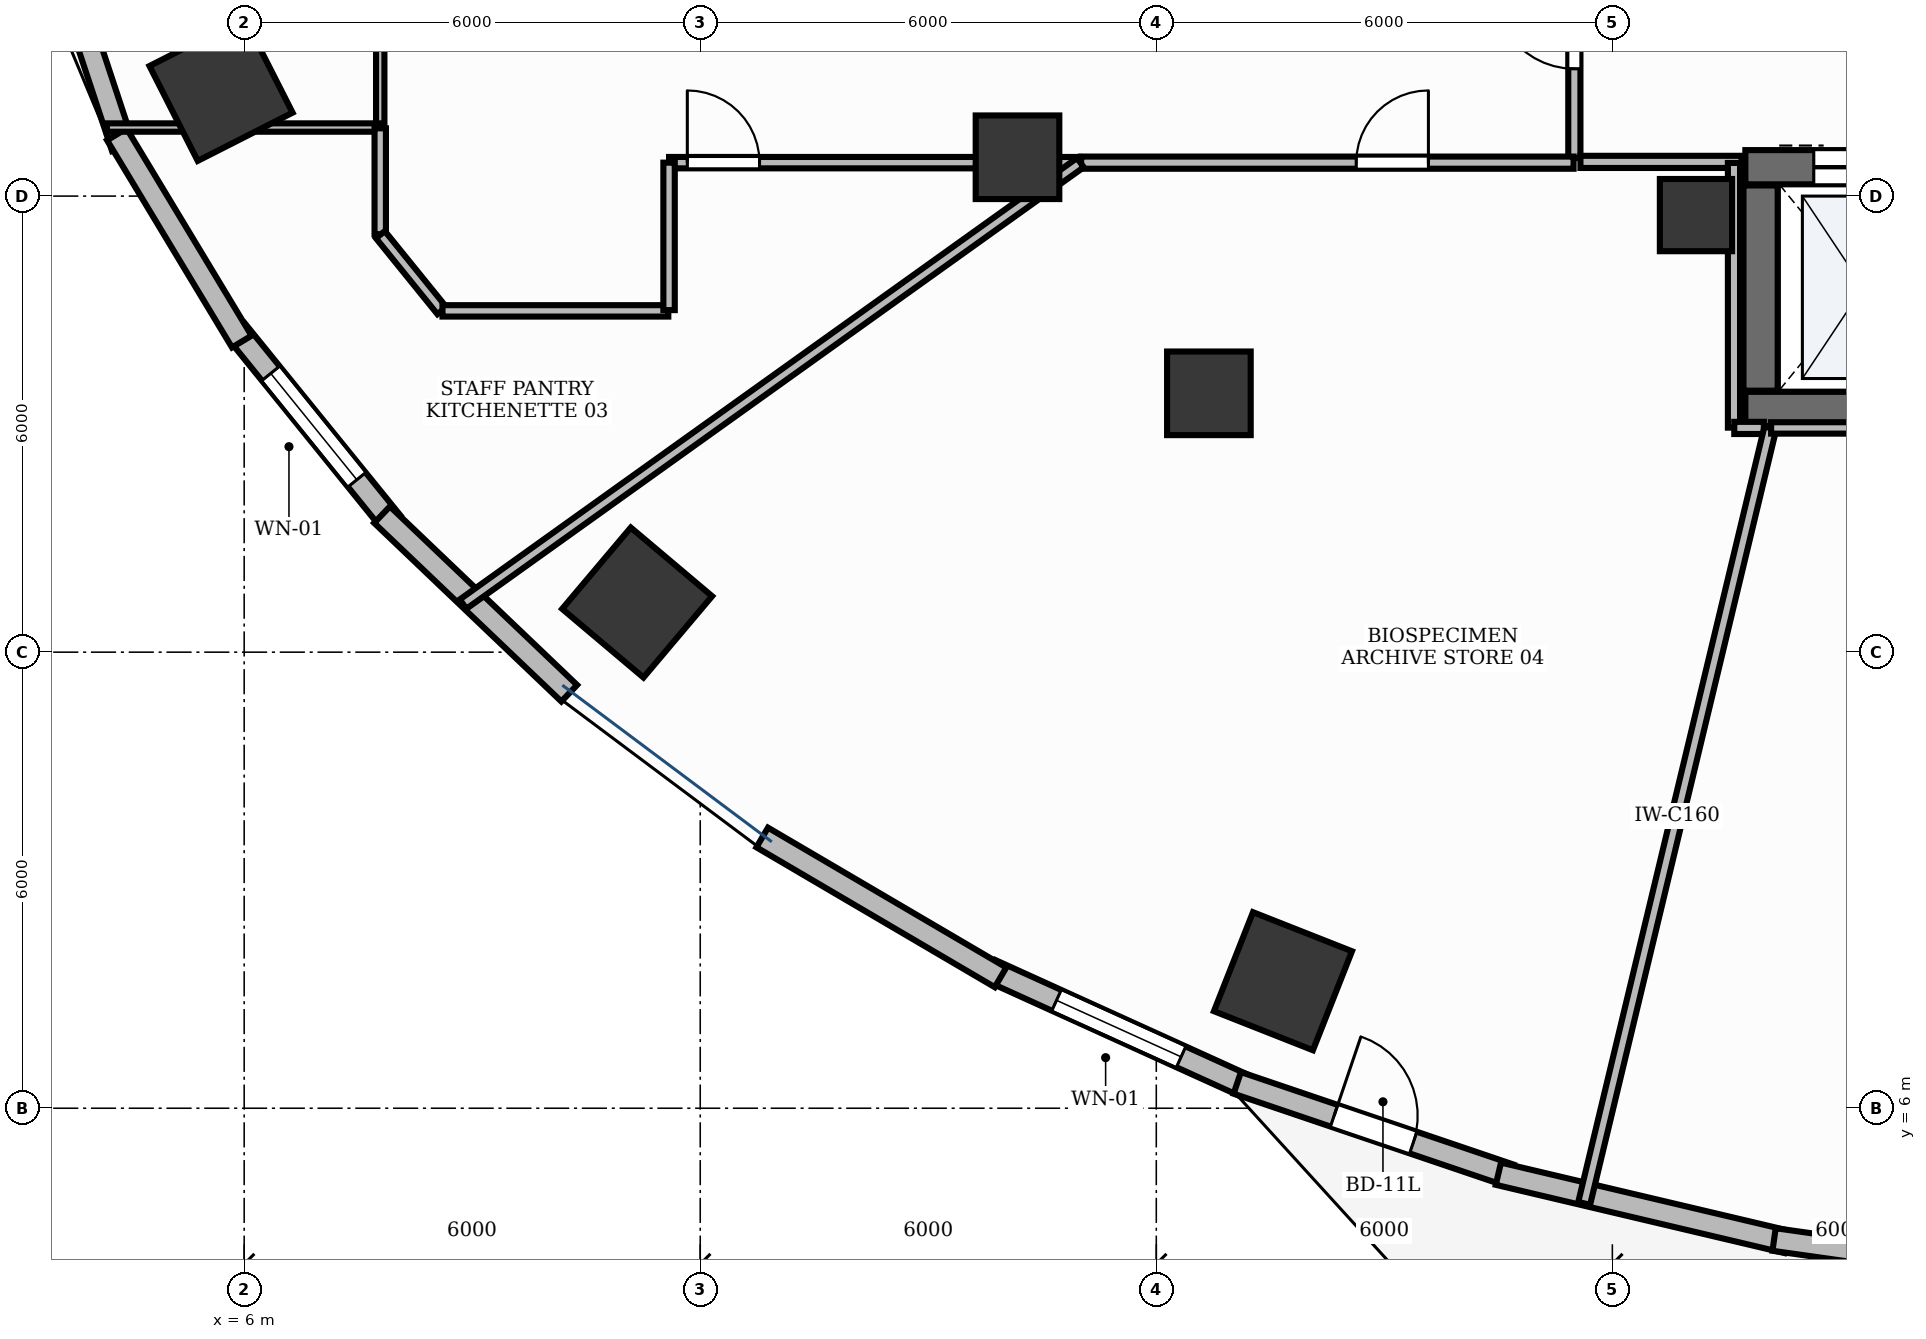
"""IFC4 building model, lengths in metres.
Left out: names, types, materials, properties, quantities, classifications, styles, units other than length and angle.
Written with IfcOpenShell. Run it as: python <this file> out.ifc"""

import sys

from ifc_helpers import new_model, si_unit, direction, frame, frame_2d, origin, origin_2d, place, context, subcontext, project, spatial, rectangle, extrude, element, fill, save


model = new_model("IFC4")
c1 = context("Model", 3, precision=1e-05, world=origin(), true_north=direction((0.0, 1.0)))
c2 = subcontext(c1, "Body", "Model", "MODEL_VIEW")
j1 = project(units=[si_unit("LENGTHUNIT", "METRE"), si_unit("PLANEANGLEUNIT", "RADIAN")], contexts=[c1])
p1 = place(None, origin())
s1 = spatial("IfcSite", under=j1, at=p1, CompositionType="ELEMENT")
p2 = place(p1, origin())
s2 = spatial("IfcBuilding", under=s1, at=p2, CompositionType="ELEMENT")
p3 = place(p2, frame((0.0, 0.0, 25.8)))
s3 = spatial("IfcBuildingStorey", under=s2, at=p3, CompositionType="ELEMENT", Elevation=25.8)
p4 = place(p3, frame((25.75, 15.2, 0.0), z_axis=(0.0, 0.0, 1.0), x_axis=(1.0, 0.0, 0.0)))
e1 = element("IfcWall", 1, at=p4, inside=s3, PredefinedType="SHEAR", context=c2, shape_type="SweptSolid", body=[
    extrude(rectangle(XDim=3.1, YDim=0.45, at=frame_2d((1.55, 0.0))), origin(), (0.0, 0.0, 1.0), 3.9),
])
p5 = place(p3, frame((25.75, 18.38, 0.0), z_axis=(0.0, 0.0, 1.0), x_axis=(1.0, 0.0, 0.0)))
e2 = element("IfcWall", 2, at=p5, inside=s3, PredefinedType="SHEAR", context=c2, shape_type="SweptSolid", body=[
    extrude(rectangle(XDim=3.1, YDim=0.45, at=frame_2d((1.55, 0.0))), origin(), (0.0, 0.0, 1.0), 3.9),
])
p6 = place(p5, frame((0.9, 0.0, 0.0)))
e3 = element("IfcOpeningElement", 3, at=p6, cuts=e2, PredefinedType="OPENING", context=c2, shape_type="SweptSolid", body=[
    extrude(rectangle(XDim=1.3, YDim=2.2, at=frame_2d((0.65, 1.1))), frame((0.0, 0.24, 0.0), z_axis=(0.0, -1.0, 0.0), x_axis=(1.0, 0.0, 0.0)), (0.0, 0.0, 1.0), 0.48),
])
p7 = place(p3, frame((25.95, 15.44, 0.0), z_axis=(0.0, 0.0, 1.0), x_axis=(0.0, 1.0, 0.0)))
e4 = element("IfcWall", 4, at=p7, inside=s3, PredefinedType="SHEAR", context=c2, shape_type="SweptSolid", body=[
    extrude(rectangle(XDim=2.7, YDim=0.45, at=frame_2d((1.35, 0.0))), origin(), (0.0, 0.0, 1.0), 3.9),
])
p8 = place(p3, frame((25.1, 17.75, -0.0), z_axis=(0.0, 0.0, 1.0), x_axis=(1.0, 0.0, 0.0)))
e5 = element("IfcColumn", 5, at=p8, inside=s3, PredefinedType="PILASTER", context=c2, shape_type="SweptSolid", body=[
    extrude(rectangle(XDim=0.95, YDim=0.95, at=origin_2d()), origin(), (0.0, 0.0, 1.0), 3.901),
])
p9 = place(p3, frame((5.696, 19.404, -0.0), z_axis=(0.0, 0.0, 1.0), x_axis=(-0.453057191132, 0.891481453292, 0.0)))
e6 = element("IfcColumn", 6, at=p9, inside=s3, PredefinedType="COLUMN", context=c2, shape_type="SweptSolid", body=[
    extrude(rectangle(XDim=1.4, YDim=1.4, at=origin_2d()), origin(), (0.0, 0.0, 1.0), 3.901),
])
p10 = place(p3, frame((16.174, 18.511, -0.0), z_axis=(0.0, 0.0, 1.0), x_axis=(1.0, 0.0, 0.0)))
e7 = element("IfcColumn", 7, at=p10, inside=s3, PredefinedType="COLUMN", context=c2, shape_type="SweptSolid", body=[
    extrude(rectangle(XDim=1.1, YDim=1.1, at=origin_2d()), origin(), (0.0, 0.0, 1.0), 3.901),
])
p11 = place(p3, frame((11.17, 12.653, -0.0), z_axis=(0.0, 0.0, 1.0), x_axis=(-0.764246456939, 0.644924300253, 0.0)))
e8 = element("IfcColumn", 8, at=p11, inside=s3, PredefinedType="COLUMN", context=c2, shape_type="SweptSolid", body=[
    extrude(rectangle(XDim=1.4, YDim=1.4, at=origin_2d()), origin(), (0.0, 0.0, 1.0), 3.901),
])
p12 = place(p3, frame((18.692, 15.405, -0.0), z_axis=(0.0, 0.0, 1.0), x_axis=(1.0, 0.0, 0.0)))
e9 = element("IfcColumn", 9, at=p12, inside=s3, PredefinedType="COLUMN", context=c2, shape_type="SweptSolid", body=[
    extrude(rectangle(XDim=1.1, YDim=1.1, at=origin_2d()), origin(), (0.0, 0.0, 1.0), 3.901),
])
p13 = place(p3, frame((19.667, 7.671, -0.0), z_axis=(0.0, 0.0, 1.0), x_axis=(-0.930225540858, 0.366988341962, 0.0)))
e10 = element("IfcColumn", 10, at=p13, inside=s3, PredefinedType="COLUMN", context=c2, shape_type="SweptSolid", body=[
    extrude(rectangle(XDim=1.4, YDim=1.4, at=origin_2d()), origin(), (0.0, 0.0, 1.0), 3.901),
])
p14 = place(p3, frame((5.894, 16.23, 0.0), z_axis=(0.0, 0.0, 1.0), x_axis=(0.629295540187, -0.777166084631, 0.0)))
e11 = element("IfcWall", 11, at=p14, inside=s3, PredefinedType="STANDARD", context=c2, shape_type="SweptSolid", body=[
    extrude(rectangle(XDim=3.248, YDim=0.3, at=frame_2d((1.624, 0.0))), origin(), (0.0, 0.0, 1.0), 3.47),
])
p15 = place(p14, frame((0.724, 0.0, 0.9)))
e12 = element("IfcOpeningElement", 12, at=p15, cuts=e11, PredefinedType="OPENING", context=c2, shape_type="SweptSolid", body=[
    extrude(rectangle(XDim=1.8, YDim=2.1, at=frame_2d((0.9, 1.05))), frame((0.0, 0.165, 0.0), z_axis=(0.0, -1.0, 0.0), x_axis=(1.0, 0.0, 0.0)), (0.0, 0.0, 1.0), 0.33),
])
p16 = place(p3, frame((15.822, 7.812, 0.0), z_axis=(0.0, 0.0, 1.0), x_axis=(0.910608120407, -0.413270917254, 0.0)))
e13 = element("IfcWall", 13, at=p16, inside=s3, PredefinedType="STANDARD", context=c2, shape_type="SweptSolid", body=[
    extrude(rectangle(XDim=3.7, YDim=0.3, at=frame_2d((1.85, 0.0))), origin(), (0.0, 0.0, 1.0), 3.9),
])
p17 = place(p16, frame((0.95, 0.0, 0.9)))
e14 = element("IfcOpeningElement", 14, at=p17, cuts=e13, PredefinedType="OPENING", context=c2, shape_type="SweptSolid", body=[
    extrude(rectangle(XDim=1.8, YDim=2.1, at=frame_2d((0.9, 1.05))), frame((0.0, 0.165, 0.0), z_axis=(0.0, -1.0, 0.0), x_axis=(1.0, 0.0, 0.0)), (0.0, 0.0, 1.0), 0.33),
])
p18 = place(p3, frame((19.065, 6.333, 0.0), z_axis=(0.0, 0.0, 1.0), x_axis=(0.947034337234, -0.321132315564, 0.0)))
e15 = element("IfcWall", 15, at=p18, inside=s3, PredefinedType="STANDARD", context=c2, shape_type="SweptSolid", body=[
    extrude(rectangle(XDim=3.79, YDim=0.3, at=frame_2d((1.895, 0.0))), origin(), (0.0, 0.0, 1.0), 3.9),
])
p19 = place(p18, frame((1.345, 0.0, 0.0)))
e16 = element("IfcOpeningElement", 16, at=p19, cuts=e15, PredefinedType="OPENING", context=c2, shape_type="SweptSolid", body=[
    extrude(rectangle(XDim=1.1, YDim=2.15, at=frame_2d((0.55, 1.075))), frame((0.0, 0.165, 0.0), z_axis=(0.0, -1.0, 0.0), x_axis=(1.0, 0.0, 0.0)), (0.0, 0.0, 1.0), 0.33),
])
p20 = place(p3, frame((2.537, 24.289, 0.0), z_axis=(0.0, 0.0, 1.0), x_axis=(0.31372816724, -0.949512841978, 0.0)))
e17 = element("IfcWall", 17, at=p20, inside=s3, PredefinedType="STANDARD", context=c2, shape_type="SweptSolid", body=[
    extrude(rectangle(XDim=5.951, YDim=0.3, at=frame_2d((2.976, 0.0))), origin(), (0.0, 0.0, 1.0), 3.9),
])
p21 = place(p3, frame((4.325, 18.812, 0.0), z_axis=(0.0, 0.0, 1.0), x_axis=(0.516423528484, -0.856333310825, 0.0)))
e18 = element("IfcWall", 18, at=p21, inside=s3, PredefinedType="STANDARD", context=c2, shape_type="SweptSolid", body=[
    extrude(rectangle(XDim=3.183, YDim=0.3, at=frame_2d((1.591, 0.0))), origin(), (0.0, 0.0, 1.0), 3.47),
])
p22 = place(p3, frame((7.814, 13.808, 0.0), z_axis=(0.0, 0.0, 1.0), x_axis=(0.72369587847, -0.69011902994, 0.0)))
e19 = element("IfcWall", 19, at=p22, inside=s3, PredefinedType="STANDARD", context=c2, shape_type="SweptSolid", body=[
    extrude(rectangle(XDim=3.403, YDim=0.3, at=frame_2d((1.701, 0.0))), origin(), (0.0, 0.0, 1.0), 3.47),
])
p23 = place(p3, frame((12.815, 9.562, 0.0), z_axis=(0.0, 0.0, 1.0), x_axis=(0.8624654944, -0.506115867139, 0.0)))
e20 = element("IfcWall", 20, at=p23, inside=s3, PredefinedType="STANDARD", context=c2, shape_type="SweptSolid", body=[
    extrude(rectangle(XDim=3.635, YDim=0.3, at=frame_2d((1.818, 0.0))), origin(), (0.0, 0.0, 1.0), 3.9),
])
p24 = place(p3, frame((22.5, 5.138, 0.0), z_axis=(0.0, 0.0, 1.0), x_axis=(0.973197600754, -0.229970497863, 0.0)))
e21 = element("IfcWall", 21, at=p24, inside=s3, PredefinedType="STANDARD", context=c2, shape_type="SweptSolid", body=[
    extrude(rectangle(XDim=3.901, YDim=0.3, at=frame_2d((1.951, 0.0))), origin(), (0.0, 0.0, 1.0), 3.9),
])
p25 = place(p3, frame((26.128, 4.273, 0.0), z_axis=(0.0, 0.0, 1.0), x_axis=(0.990165832998, -0.139898617443, 0.0)))
e22 = element("IfcWall", 22, at=p25, inside=s3, PredefinedType="STANDARD", context=c2, shape_type="SweptSolid", body=[
    extrude(rectangle(XDim=3.951, YDim=0.3, at=frame_2d((1.976, 0.0))), origin(), (0.0, 0.0, 1.0), 3.9),
])
p26 = place(p3, frame((23.5, 18.5, 0.0), z_axis=(0.0, 0.0, 1.0), x_axis=(0.0, 1.0, 0.0)))
e23 = element("IfcWall", 23, at=p26, inside=s3, PredefinedType="PARTITIONING", context=c2, shape_type="SweptSolid", body=[
    extrude(rectangle(XDim=3.4, YDim=0.16, at=frame_2d((1.7, 0.0))), origin(), (0.0, 0.0, 1.0), 2.91),
])
p27 = place(p26, frame((1.175, 0.0, 0.0)))
e24 = element("IfcOpeningElement", 24, at=p27, cuts=e23, PredefinedType="OPENING", context=c2, shape_type="SweptSolid", body=[
    extrude(rectangle(XDim=1.05, YDim=2.15, at=frame_2d((0.525, 1.075))), frame((0.0, 0.095, 0.0), z_axis=(0.0, -1.0, 0.0), x_axis=(1.0, 0.0, 0.0)), (0.0, 0.0, 1.0), 0.19),
])
p28 = place(p3, frame((23.58, 18.45, 0.0), z_axis=(0.0, 0.0, 1.0), x_axis=(1.0, 0.0, 0.0)))
e25 = element("IfcWall", 25, at=p28, inside=s3, PredefinedType="PARTITIONING", context=c2, shape_type="SweptSolid", body=[
    extrude(rectangle(XDim=2.12, YDim=0.16, at=frame_2d((1.06, 0.0))), origin(), (0.0, 0.0, 1.0), 2.91),
])
p29 = place(p3, frame((7.79, 28.013, 0.0), z_axis=(0.0, 0.0, 1.0), x_axis=(0.0, -1.0, 0.0)))
e26 = element("IfcWall", 26, at=p29, inside=s3, PredefinedType="MOVABLE", context=c2, shape_type="SweptSolid", body=[
    extrude(rectangle(XDim=9.111, YDim=0.11, at=frame_2d((4.555, 0.0))), origin(), (0.0, 0.0, 1.0), 2.91),
])
p30 = place(p29, frame((1.273, 0.0, 0.0)))
e27 = element("IfcOpeningElement", 27, at=p30, cuts=e26, PredefinedType="OPENING", context=c2, shape_type="SweptSolid", body=[
    extrude(rectangle(XDim=0.95, YDim=2.15, at=frame_2d((0.475, 1.075))), frame((0.0, 0.07, 0.0), z_axis=(0.0, -1.0, 0.0), x_axis=(1.0, 0.0, 0.0)), (0.0, 0.0, 1.0), 0.14),
])
p31 = place(p3, frame((11.59, 18.44, 0.0), z_axis=(0.0, 0.0, 1.0), x_axis=(1.0, 0.0, 0.0)))
e28 = element("IfcWall", 28, at=p31, inside=s3, PredefinedType="PARTITIONING", context=c2, shape_type="SweptSolid", body=[
    extrude(rectangle(XDim=5.411, YDim=0.15, at=frame_2d((2.706, 0.0))), origin(), (0.0, 0.0, 1.0), 2.91),
])
p32 = place(p31, frame((0.24, 0.0, 0.0)))
e29 = element("IfcOpeningElement", 29, at=p32, cuts=e28, PredefinedType="OPENING", context=c2, shape_type="SweptSolid", body=[
    extrude(rectangle(XDim=0.95, YDim=2.15, at=frame_2d((0.475, 1.075))), frame((0.0, 0.09, 0.0), z_axis=(0.0, -1.0, 0.0), x_axis=(1.0, 0.0, 0.0)), (0.0, 0.0, 1.0), 0.18),
])
p33 = place(p3, frame((17.011, 18.44, 0.0), z_axis=(0.0, 0.0, 1.0), x_axis=(1.0, 0.0, 0.0)))
e30 = element("IfcWall", 30, at=p33, inside=s3, PredefinedType="PARTITIONING", context=c2, shape_type="SweptSolid", body=[
    extrude(rectangle(XDim=6.479, YDim=0.16, at=frame_2d((3.24, 0.0))), origin(), (0.0, 0.0, 1.0), 2.91),
])
p34 = place(p33, frame((3.619, 0.0, 0.0)))
e31 = element("IfcOpeningElement", 31, at=p34, cuts=e30, PredefinedType="OPENING", context=c2, shape_type="SweptSolid", body=[
    extrude(rectangle(XDim=0.95, YDim=2.15, at=frame_2d((0.475, 1.075))), frame((0.0, 0.095, 0.0), z_axis=(0.0, -1.0, 0.0), x_axis=(1.0, 0.0, 0.0)), (0.0, 0.0, 1.0), 0.19),
])
p35 = place(p3, frame((7.79, 18.902, 0.0), z_axis=(0.0, 0.0, 1.0), x_axis=(-1.0, 0.0, 0.0)))
e32 = element("IfcWall", 32, at=p35, inside=s3, PredefinedType="MOVABLE", context=c2, shape_type="SweptSolid", body=[
    extrude(rectangle(XDim=3.596, YDim=0.11, at=frame_2d((1.798, 0.0))), origin(), (0.0, 0.0, 1.0), 2.91),
])
p36 = place(p3, frame((7.79, 18.892, 0.0), z_axis=(0.0, 0.0, 1.0), x_axis=(0.0, -1.0, 0.0)))
e33 = element("IfcWall", 33, at=p36, inside=s3, PredefinedType="PARTITIONING", context=c2, shape_type="SweptSolid", body=[
    extrude(rectangle(XDim=1.393, YDim=0.15, at=frame_2d((0.697, 0.0))), origin(), (0.0, 0.0, 1.0), 2.91),
])
p37 = place(p3, frame((7.792, 17.492, 0.0), z_axis=(0.0, 0.0, 1.0), x_axis=(0.629225554682, -0.777222748854, 0.0)))
e34 = element("IfcWall", 34, at=p37, inside=s3, PredefinedType="PARTITIONING", context=c2, shape_type="SweptSolid", body=[
    extrude(rectangle(XDim=1.285, YDim=0.15, at=frame_2d((0.643, 0.0))), origin(), (0.0, 0.0, 1.0), 2.91),
])
p38 = place(p3, frame((8.609, 16.49, 0.0), z_axis=(0.0, 0.0, 1.0), x_axis=(1.0, 0.0, 0.0)))
e35 = element("IfcWall", 35, at=p38, inside=s3, PredefinedType="PARTITIONING", context=c2, shape_type="SweptSolid", body=[
    extrude(rectangle(XDim=2.971, YDim=0.15, at=frame_2d((1.486, 0.0))), origin(), (0.0, 0.0, 1.0), 2.91),
])
p39 = place(p3, frame((11.59, 16.5, 0.0), z_axis=(0.0, 0.0, 1.0), x_axis=(0.0, 1.0, 0.0)))
e36 = element("IfcWall", 36, at=p39, inside=s3, PredefinedType="PARTITIONING", context=c2, shape_type="SweptSolid", body=[
    extrude(rectangle(XDim=1.94, YDim=0.15, at=frame_2d((0.97, 0.0))), origin(), (0.0, 0.0, 1.0), 2.91),
])
p40 = place(p3, frame((17.001, 18.44, 0.0), z_axis=(0.0, 0.0, 1.0), x_axis=(-0.813397935838, -0.581707656796, 0.0)))
e37 = element("IfcWall", 37, at=p40, inside=s3, PredefinedType="PARTITIONING", context=c2, shape_type="SweptSolid", body=[
    extrude(rectangle(XDim=9.984, YDim=0.15, at=frame_2d((4.992, 0.0))), origin(), (0.0, 0.0, 1.0), 2.91),
])
p41 = place(p3, frame((25.6, 18.436, 0.0), z_axis=(0.0, 0.0, 1.0), x_axis=(0.0, -1.0, 0.0)))
e38 = element("IfcWall", 38, at=p41, inside=s3, PredefinedType="PARTITIONING", context=c2, shape_type="SweptSolid", body=[
    extrude(rectangle(XDim=3.482, YDim=0.16, at=frame_2d((1.741, 0.0))), origin(), (0.0, 0.0, 1.0), 2.91),
])
p42 = place(p3, frame((25.604, 14.95, 0.0), z_axis=(0.0, 0.0, 1.0), x_axis=(1.0, 0.0, 0.0)))
e39 = element("IfcWall", 39, at=p42, inside=s3, PredefinedType="PARTITIONING", context=c2, shape_type="SweptSolid", body=[
    extrude(rectangle(XDim=0.389, YDim=0.16, at=frame_2d((0.195, 0.0))), origin(), (0.0, 0.0, 1.0), 2.91),
])
p43 = place(p3, frame((26.079, 14.95, 0.0), z_axis=(0.0, 0.0, 1.0), x_axis=(-0.233446881406, -0.972369556065, 0.0)))
e40 = element("IfcWall", 40, at=p43, inside=s3, PredefinedType="PARTITIONING", context=c2, shape_type="SweptSolid", body=[
    extrude(rectangle(XDim=10.491, YDim=0.16, at=frame_2d((5.246, 0.0))), origin(), (0.0, 0.0, 1.0), 2.91),
])
p44 = place(p3, frame((26.089, 14.95, 0.0), z_axis=(0.0, 0.0, 1.0), x_axis=(1.0, 0.0, 0.0)))
e41 = element("IfcWall", 41, at=p44, inside=s3, PredefinedType="PARTITIONING", context=c2, shape_type="SweptSolid", body=[
    extrude(rectangle(XDim=2.907, YDim=0.15, at=frame_2d((1.454, 0.0))), origin(), (0.0, 0.0, 1.0), 2.91),
])
p45 = place(p15, origin())
e42 = element("IfcWindow", 42, at=p45, inside=s3, PartitioningType="SINGLE_PANEL", PredefinedType="WINDOW", context=c2, shape_type="SweptSolid", body=[
    extrude(rectangle(XDim=1.8, YDim=2.1, at=frame_2d((0.9, 1.05))), frame((0.0, 0.03, 0.0), z_axis=(0.0, -1.0, 0.0), x_axis=(1.0, 0.0, 0.0)), (0.0, 0.0, 1.0), 0.06),
])
fill(e12, e42)
p46 = place(p17, origin())
e43 = element("IfcWindow", 43, at=p46, inside=s3, PartitioningType="SINGLE_PANEL", PredefinedType="WINDOW", context=c2, shape_type="SweptSolid", body=[
    extrude(rectangle(XDim=1.8, YDim=2.1, at=frame_2d((0.9, 1.05))), frame((0.0, 0.03, 0.0), z_axis=(0.0, -1.0, 0.0), x_axis=(1.0, 0.0, 0.0)), (0.0, 0.0, 1.0), 0.06),
])
fill(e14, e43)
p47 = place(p19, origin())
e44 = element("IfcDoor", 44, at=p47, inside=s3, OperationType="SINGLE_SWING_LEFT", PredefinedType="DOOR", context=c2, shape_type="SweptSolid", body=[
    extrude(rectangle(XDim=1.1, YDim=2.15, at=frame_2d((0.55, 1.075))), frame((0.0, 0.025, 0.0), z_axis=(0.0, -1.0, 0.0), x_axis=(1.0, 0.0, 0.0)), (0.0, 0.0, 1.0), 0.05),
])
fill(e16, e44)
p48 = place(p6, origin())
e45 = element("IfcDoor", 45, at=p48, inside=s3, OperationType="DOUBLE_DOOR_SLIDING", PredefinedType="DOOR", context=c2, shape_type="SweptSolid", body=[
    extrude(rectangle(XDim=1.3, YDim=2.2, at=frame_2d((0.65, 1.1))), frame((0.0, 0.025, 0.0), z_axis=(0.0, -1.0, 0.0), x_axis=(1.0, 0.0, 0.0)), (0.0, 0.0, 1.0), 0.05),
])
fill(e3, e45)
p49 = place(p27, origin())
e46 = element("IfcDoor", 46, at=p49, inside=s3, OperationType="SINGLE_SWING_RIGHT", PredefinedType="DOOR", context=c2, shape_type="SweptSolid", body=[
    extrude(rectangle(XDim=1.05, YDim=2.15, at=frame_2d((0.525, 1.075))), frame((0.0, 0.025, 0.0), z_axis=(0.0, -1.0, 0.0), x_axis=(1.0, 0.0, 0.0)), (0.0, 0.0, 1.0), 0.05),
])
fill(e24, e46)
p50 = place(p32, origin())
e47 = element("IfcDoor", 47, at=p50, inside=s3, OperationType="SINGLE_SWING_LEFT", PredefinedType="DOOR", context=c2, shape_type="SweptSolid", body=[
    extrude(rectangle(XDim=0.95, YDim=2.15, at=frame_2d((0.475, 1.075))), frame((0.0, 0.025, 0.0), z_axis=(0.0, -1.0, 0.0), x_axis=(1.0, 0.0, 0.0)), (0.0, 0.0, 1.0), 0.05),
])
fill(e29, e47)
p51 = place(p34, origin())
e48 = element("IfcDoor", 48, at=p51, inside=s3, OperationType="SINGLE_SWING_RIGHT", PredefinedType="DOOR", context=c2, shape_type="SweptSolid", body=[
    extrude(rectangle(XDim=0.95, YDim=2.15, at=frame_2d((0.475, 1.075))), frame((0.0, 0.025, 0.0), z_axis=(0.0, -1.0, 0.0), x_axis=(1.0, 0.0, 0.0)), (0.0, 0.0, 1.0), 0.05),
])
fill(e31, e48)
save(model, sys.argv[1])
